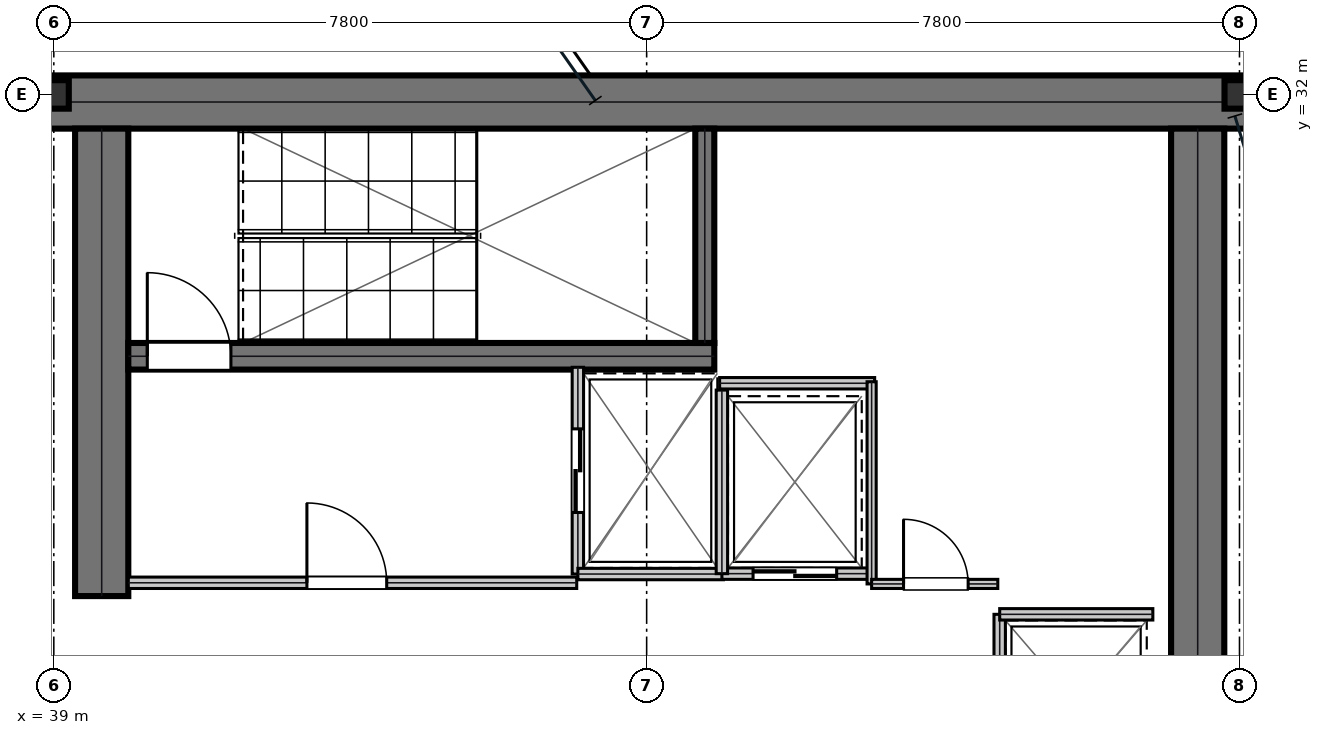
"""IFC4 building model, lengths in metres.
Left out: names, types, materials, properties, quantities, classifications, styles, units other than length and angle.
Written with IfcOpenShell. Run it as: python <this file> out.ifc"""

import sys

from ifc_helpers import new_model, si_unit, direction, frame, frame_2d, origin, origin_2d, place, context, subcontext, project, spatial, rectangle, i_section, extrude, element, fill, save


model = new_model("IFC4")
c1 = context("Model", 3, precision=1e-05, world=origin(), true_north=direction((0.0, 1.0)))
c2 = subcontext(c1, "Body", "Model", "MODEL_VIEW")
j1 = project(units=[si_unit("LENGTHUNIT", "METRE"), si_unit("PLANEANGLEUNIT", "RADIAN")], contexts=[c1])
p1 = place(None, origin())
s1 = spatial("IfcSite", under=j1, at=p1, CompositionType="ELEMENT")
p2 = place(p1, origin())
s2 = spatial("IfcBuilding", under=s1, at=p2, CompositionType="ELEMENT")
p3 = place(p2, frame((0.0, 0.0, 224.25)))
s3 = spatial("IfcBuildingStorey", under=s2, at=p3, CompositionType="ELEMENT", Elevation=224.25)
p4 = place(p3, frame((38.8, 31.9, 0.0), z_axis=(0.0, 0.0, 1.0), x_axis=(1.0, 0.0, 0.0)))
e1 = element("IfcWall", 1, at=p4, inside=s3, PredefinedType="SHEAR", context=c2, shape_type="SweptSolid", body=[
    extrude(rectangle(XDim=16.0, YDim=0.7, at=frame_2d((8.0, 0.0))), origin(), (0.0, 0.0, 1.0), 3.79),
])
p5 = place(p3, frame((39.63, 25.4, 0.0), z_axis=(0.0, 0.0, 1.0), x_axis=(0.0, 1.0, 0.0)))
e2 = element("IfcWall", 2, at=p5, inside=s3, PredefinedType="SHEAR", context=c2, shape_type="SweptSolid", body=[
    extrude(rectangle(XDim=6.15, YDim=0.7, at=frame_2d((3.075, 0.0))), origin(), (0.0, 0.0, 1.0), 3.79),
])
p6 = place(p3, frame((54.05, 16.45, 0.0), z_axis=(0.0, 0.0, 1.0), x_axis=(0.0, 1.0, 0.0)))
e3 = element("IfcWall", 3, at=p6, inside=s3, PredefinedType="SHEAR", context=c2, shape_type="SweptSolid", body=[
    extrude(rectangle(XDim=15.1, YDim=0.7, at=frame_2d((7.55, 0.0))), origin(), (0.0, 0.0, 1.0), 3.79),
])
p7 = place(p3, frame((39.98, 28.555, 0.0), z_axis=(0.0, 0.0, 1.0), x_axis=(1.0, 0.0, 0.0)))
e4 = element("IfcWall", 4, at=p7, inside=s3, PredefinedType="SHEAR", context=c2, shape_type="SweptSolid", body=[
    extrude(rectangle(XDim=7.71, YDim=0.35, at=frame_2d((3.855, 0.0))), origin(), (0.0, 0.0, 1.0), 3.79),
])
p8 = place(p7, frame((0.25, 0.0, 0.0)))
e5 = element("IfcOpeningElement", 5, at=p8, cuts=e4, PredefinedType="OPENING", context=c2, shape_type="SweptSolid", body=[
    extrude(rectangle(XDim=1.1, YDim=2.15, at=frame_2d((0.55, 1.075))), frame((0.0, 0.185, 0.0), z_axis=(0.0, -1.0, 0.0), x_axis=(1.0, 0.0, 0.0)), (0.0, 0.0, 1.0), 0.37),
])
p9 = place(p3, frame((47.565, 28.73, 0.0), z_axis=(0.0, 0.0, 1.0), x_axis=(0.0, 1.0, 0.0)))
e6 = element("IfcWall", 6, at=p9, inside=s3, PredefinedType="SHEAR", context=c2, shape_type="SweptSolid", body=[
    extrude(rectangle(XDim=2.82, YDim=0.25, at=frame_2d((1.41, 0.0))), origin(), (0.0, 0.0, 1.0), 3.79),
])
for number, where, z_axis, x_axis in (
    (7, (39.0, 32.0, 0.0), (0.0, 0.0, 1.0), (1.0, 0.0, 0.0)),
    (8, (54.6, 32.0, 0.0), (0.0, 0.0, 1.0), (1.0, 0.0, 0.0)),
):
    element("IfcColumn", number, at=place(p3, frame(where, z_axis=z_axis, x_axis=x_axis)), inside=s3, PredefinedType="COLUMN", context=c2, shape_type="SweptSolid", body=[
        extrude(i_section(OverallWidth=0.394, OverallDepth=0.375, WebThickness=0.017, FlangeThickness=0.028, at=origin_2d()), origin(), (0.0, 0.0, 1.0), 4.044),
    ])
p10 = place(p3, frame((39.98, 25.575, 0.0), z_axis=(0.0, 0.0, 1.0), x_axis=(1.0, 0.0, 0.0)))
e9 = element("IfcWall", 9, at=p10, inside=s3, PredefinedType="PARTITIONING", context=c2, shape_type="SweptSolid", body=[
    extrude(rectangle(XDim=5.9, YDim=0.15, at=frame_2d((2.95, 0.0))), origin(), (0.0, 0.0, 1.0), 3.79),
])
p11 = place(p10, frame((2.35, 0.0, 0.0)))
e10 = element("IfcOpeningElement", 10, at=p11, cuts=e9, PredefinedType="OPENING", context=c2, shape_type="SweptSolid", body=[
    extrude(rectangle(XDim=1.05, YDim=2.15, at=frame_2d((0.525, 1.075))), frame((0.0, 0.085, 0.0), z_axis=(0.0, -1.0, 0.0), x_axis=(1.0, 0.0, 0.0)), (0.0, 0.0, 1.0), 0.17),
])
p12 = place(p3, frame((45.895, 25.69, 0.0), z_axis=(0.0, 0.0, 1.0), x_axis=(0.0, 1.0, 0.0)))
e11 = element("IfcWall", 11, at=p12, inside=s3, PredefinedType="PARTITIONING", context=c2, shape_type="SweptSolid", body=[
    extrude(rectangle(XDim=2.72, YDim=0.15, at=frame_2d((1.36, 0.0))), origin(), (0.0, 0.0, 1.0), 3.79),
])
p13 = place(p12, frame((0.81, 0.0, 0.0)))
e12 = element("IfcOpeningElement", 12, at=p13, cuts=e11, PredefinedType="OPENING", context=c2, shape_type="SweptSolid", body=[
    extrude(rectangle(XDim=1.1, YDim=2.15, at=frame_2d((0.55, 1.075))), frame((0.0, 0.085, 0.0), z_axis=(0.0, -1.0, 0.0), x_axis=(1.0, 0.0, 0.0)), (0.0, 0.0, 1.0), 0.17),
])
p14 = place(p3, frame((45.895, 25.69, 0.0), z_axis=(0.0, 0.0, 1.0), x_axis=(1.0, 0.0, 0.0)))
e13 = element("IfcWall", 13, at=p14, inside=s3, PredefinedType="PARTITIONING", context=c2, shape_type="SweptSolid", body=[
    extrude(rectangle(XDim=1.915, YDim=0.15, at=frame_2d((0.958, 0.0))), origin(), (0.0, 0.0, 1.0), 3.79),
])
p15 = place(p3, frame((47.79, 25.695, 0.0), z_axis=(0.0, 0.0, 1.0), x_axis=(1.0, 0.0, 0.0)))
e14 = element("IfcWall", 14, at=p15, inside=s3, PredefinedType="PARTITIONING", context=c2, shape_type="SweptSolid", body=[
    extrude(rectangle(XDim=1.92, YDim=0.15, at=frame_2d((0.96, 0.0))), origin(), (0.0, 0.0, 1.0), 3.79),
])
p16 = place(p15, frame((0.41, 0.0, 0.0)))
e15 = element("IfcOpeningElement", 15, at=p16, cuts=e14, PredefinedType="OPENING", context=c2, shape_type="SweptSolid", body=[
    extrude(rectangle(XDim=1.1, YDim=2.15, at=frame_2d((0.55, 1.075))), frame((0.0, 0.085, 0.0), z_axis=(0.0, -1.0, 0.0), x_axis=(1.0, 0.0, 0.0)), (0.0, 0.0, 1.0), 0.17),
])
p17 = place(p3, frame((47.79, 25.695, 0.0), z_axis=(0.0, 0.0, 1.0), x_axis=(0.0, 1.0, 0.0)))
e16 = element("IfcWall", 16, at=p17, inside=s3, PredefinedType="PARTITIONING", context=c2, shape_type="SweptSolid", body=[
    extrude(rectangle(XDim=2.415, YDim=0.15, at=frame_2d((1.208, 0.0))), origin(), (0.0, 0.0, 1.0), 3.79),
])
p18 = place(p3, frame((51.445, 22.84, 0.0), z_axis=(0.0, 0.0, 1.0), x_axis=(0.0, 1.0, 0.0)))
e17 = element("IfcWall", 17, at=p18, inside=s3, PredefinedType="PARTITIONING", context=c2, shape_type="SweptSolid", body=[
    extrude(rectangle(XDim=2.32, YDim=0.15, at=frame_2d((1.16, 0.0))), origin(), (0.0, 0.0, 1.0), 3.79),
])
p19 = place(p18, frame((0.61, 0.0, 0.0)))
e18 = element("IfcOpeningElement", 18, at=p19, cuts=e17, PredefinedType="OPENING", context=c2, shape_type="SweptSolid", body=[
    extrude(rectangle(XDim=1.1, YDim=2.15, at=frame_2d((0.55, 1.075))), frame((0.0, 0.085, 0.0), z_axis=(0.0, -1.0, 0.0), x_axis=(1.0, 0.0, 0.0)), (0.0, 0.0, 1.0), 0.17),
])
p20 = place(p3, frame((51.445, 25.16, 0.0), z_axis=(0.0, 0.0, 1.0), x_axis=(1.0, 0.0, 0.0)))
e19 = element("IfcWall", 19, at=p20, inside=s3, PredefinedType="PARTITIONING", context=c2, shape_type="SweptSolid", body=[
    extrude(rectangle(XDim=2.015, YDim=0.15, at=frame_2d((1.007, 0.0))), origin(), (0.0, 0.0, 1.0), 3.79),
])
p21 = place(p3, frame((47.76, 28.2, 0.0), z_axis=(0.0, 0.0, 1.0), x_axis=(1.0, 0.0, 0.0)))
e20 = element("IfcWall", 20, at=p21, inside=s3, PredefinedType="PARTITIONING", context=c2, shape_type="SweptSolid", body=[
    extrude(rectangle(XDim=2.04, YDim=0.15, at=frame_2d((1.02, 0.0))), origin(), (0.0, 0.0, 1.0), 3.79),
])
p22 = place(p3, frame((49.76, 25.56, 0.0), z_axis=(0.0, 0.0, 1.0), x_axis=(0.0, 1.0, 0.0)))
e21 = element("IfcWall", 21, at=p22, inside=s3, PredefinedType="PARTITIONING", context=c2, shape_type="SweptSolid", body=[
    extrude(rectangle(XDim=2.66, YDim=0.12, at=frame_2d((1.33, 0.0))), origin(), (0.0, 0.0, 1.0), 3.79),
])
p23 = place(p3, frame((49.76, 25.56, 0.0), z_axis=(0.0, 0.0, 1.0), x_axis=(1.0, 0.0, 0.0)))
e22 = element("IfcWall", 22, at=p23, inside=s3, PredefinedType="PARTITIONING", context=c2, shape_type="SweptSolid", body=[
    extrude(rectangle(XDim=1.66, YDim=0.12, at=frame_2d((0.83, 0.0))), origin(), (0.0, 0.0, 1.0), 3.79),
])
p24 = place(p23, frame((0.42, 0.0, 0.0)))
e23 = element("IfcOpeningElement", 23, at=p24, cuts=e22, PredefinedType="OPENING", context=c2, shape_type="SweptSolid", body=[
    extrude(rectangle(XDim=0.85, YDim=2.15, at=frame_2d((0.425, 1.075))), frame((0.0, 0.07, 0.0), z_axis=(0.0, -1.0, 0.0), x_axis=(1.0, 0.0, 0.0)), (0.0, 0.0, 1.0), 0.14),
])
p25 = place(p11, origin())
e24 = element("IfcDoor", 24, at=p25, inside=s3, OperationType="SINGLE_SWING_LEFT", PredefinedType="DOOR", context=c2, shape_type="SweptSolid", body=[
    extrude(rectangle(XDim=1.05, YDim=2.15, at=frame_2d((0.525, 1.075))), frame((0.0, 0.025, 0.0), z_axis=(0.0, -1.0, 0.0), x_axis=(1.0, 0.0, 0.0)), (0.0, 0.0, 1.0), 0.05),
])
fill(e10, e24)
p26 = place(p13, frame((1.1, 0.0, 0.0), z_axis=(0.0, 0.0, 1.0), x_axis=(-1.0, 0.0, 0.0)))
e25 = element("IfcDoor", 25, at=p26, inside=s3, OperationType="DOUBLE_DOOR_SLIDING", PredefinedType="DOOR", context=c2, shape_type="SweptSolid", body=[
    extrude(rectangle(XDim=1.1, YDim=2.15, at=frame_2d((0.55, 1.075))), frame((0.0, 0.025, 0.0), z_axis=(0.0, -1.0, 0.0), x_axis=(1.0, 0.0, 0.0)), (0.0, 0.0, 1.0), 0.05),
])
fill(e12, e25)
p27 = place(p16, frame((1.1, 0.0, 0.0), z_axis=(0.0, 0.0, 1.0), x_axis=(-1.0, 0.0, 0.0)))
e26 = element("IfcDoor", 26, at=p27, inside=s3, OperationType="DOUBLE_DOOR_SLIDING", PredefinedType="DOOR", context=c2, shape_type="SweptSolid", body=[
    extrude(rectangle(XDim=1.1, YDim=2.15, at=frame_2d((0.55, 1.075))), frame((0.0, 0.025, 0.0), z_axis=(0.0, -1.0, 0.0), x_axis=(1.0, 0.0, 0.0)), (0.0, 0.0, 1.0), 0.05),
])
fill(e15, e26)
p28 = place(p24, origin())
e27 = element("IfcDoor", 27, at=p28, inside=s3, OperationType="SINGLE_SWING_LEFT", PredefinedType="DOOR", context=c2, shape_type="SweptSolid", body=[
    extrude(rectangle(XDim=0.85, YDim=2.15, at=frame_2d((0.425, 1.075))), frame((0.0, 0.025, 0.0), z_axis=(0.0, -1.0, 0.0), x_axis=(1.0, 0.0, 0.0)), (0.0, 0.0, 1.0), 0.05),
])
fill(e23, e27)
p29 = place(p8, origin())
e28 = element("IfcDoor", 28, at=p29, inside=s3, OperationType="SINGLE_SWING_LEFT", PredefinedType="DOOR", context=c2, shape_type="SweptSolid", body=[
    extrude(rectangle(XDim=1.1, YDim=2.15, at=frame_2d((0.55, 1.075))), frame((0.0, 0.025, 0.0), z_axis=(0.0, -1.0, 0.0), x_axis=(1.0, 0.0, 0.0)), (0.0, 0.0, 1.0), 0.05),
])
fill(e5, e28)
save(model, sys.argv[1])
